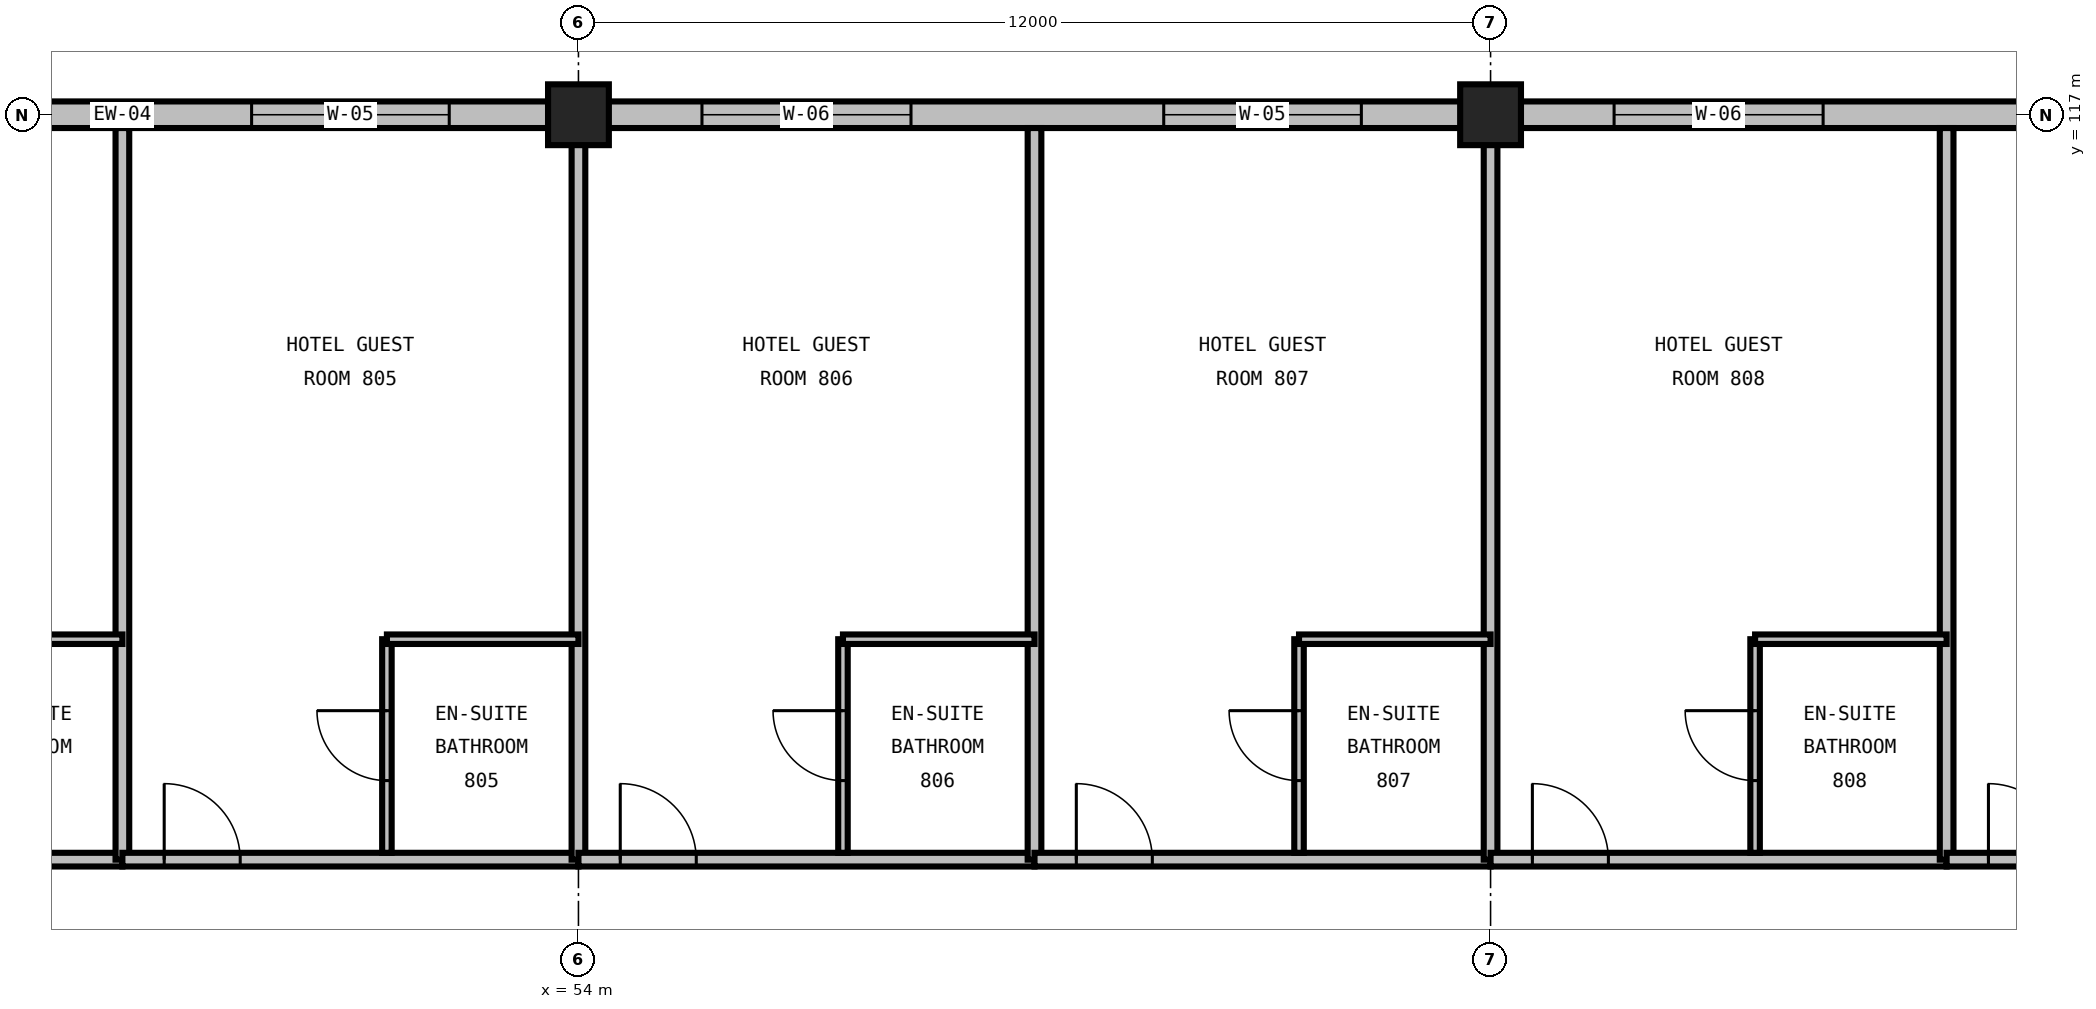
"""IFC4 building model, lengths in metres.
Left out: names, types, materials, properties, quantities, classifications, styles, units other than length and angle.
Written with IfcOpenShell. Run it as: python <this file> out.ifc"""

import sys

from ifc_helpers import new_model, si_unit, direction, frame, frame_2d, origin, origin_2d, place, context, subcontext, project, spatial, rectangle, extrude, element, fill, save


model = new_model("IFC4")
c1 = context("Model", 3, precision=1e-05, world=origin(), true_north=direction((0.0, 1.0)))
c2 = subcontext(c1, "Body", "Model", "MODEL_VIEW")
j1 = project(units=[si_unit("LENGTHUNIT", "METRE"), si_unit("PLANEANGLEUNIT", "RADIAN")], contexts=[c1])
p1 = place(None, origin())
s1 = spatial("IfcSite", under=j1, at=p1, CompositionType="ELEMENT")
p2 = place(p1, origin())
s2 = spatial("IfcBuilding", under=s1, at=p2, CompositionType="ELEMENT")
p3 = place(p2, frame((0.0, 0.0, 38.4)))
s3 = spatial("IfcBuildingStorey", under=s2, at=p3, CompositionType="ELEMENT", Elevation=38.4)
for number, where, z_axis, x_axis in (
    (1, (54.0, 117.0, 0.0), (0.0, 0.0, 1.0), (1.0, 0.0, 0.0)),
    (2, (66.0, 117.0, 0.0), (0.0, 0.0, 1.0), (1.0, 0.0, 0.0)),
):
    element("IfcColumn", number, at=place(p3, frame(where, z_axis=z_axis, x_axis=x_axis)), inside=s3, PredefinedType="COLUMN", context=c2, shape_type="SweptSolid", body=[
        extrude(rectangle(XDim=0.8, YDim=0.8, at=origin_2d()), origin(), (0.0, 0.0, 1.0), 3.6),
    ])
p4 = place(p3, frame((54.0, 117.0, 0.0), z_axis=(0.0, 0.0, 1.0), x_axis=(-1.0, 0.0, 0.0)))
e3 = element("IfcWall", 3, at=p4, inside=s3, PredefinedType="STANDARD", context=c2, shape_type="SweptSolid", body=[
    extrude(rectangle(XDim=12.0, YDim=0.35, at=frame_2d((6.0, 0.0))), origin(), (0.0, 0.0, 1.0), 2.486),
])
p5 = place(p4, frame((1.7, 0.0, 0.72)))
e4 = element("IfcOpeningElement", 4, at=p5, cuts=e3, PredefinedType="OPENING", context=c2, shape_type="SweptSolid", body=[
    extrude(rectangle(XDim=2.6, YDim=1.69, at=frame_2d((1.3, 0.845))), frame((0.0, 0.19, 0.0), z_axis=(0.0, -1.0, 0.0), x_axis=(1.0, 0.0, 0.0)), (0.0, 0.0, 1.0), 0.38),
])
p6 = place(p4, frame((7.625, 0.0, 0.72)))
e5 = element("IfcOpeningElement", 5, at=p6, cuts=e3, PredefinedType="OPENING", context=c2, shape_type="SweptSolid", body=[
    extrude(rectangle(XDim=2.75, YDim=1.69, at=frame_2d((1.375, 0.845))), frame((0.0, 0.19, 0.0), z_axis=(0.0, -1.0, 0.0), x_axis=(1.0, 0.0, 0.0)), (0.0, 0.0, 1.0), 0.38),
])
p7 = place(p3, frame((66.0, 117.0, 0.0), z_axis=(0.0, 0.0, 1.0), x_axis=(-1.0, 0.0, 0.0)))
e6 = element("IfcWall", 6, at=p7, inside=s3, PredefinedType="STANDARD", context=c2, shape_type="SweptSolid", body=[
    extrude(rectangle(XDim=12.0, YDim=0.35, at=frame_2d((6.0, 0.0))), origin(), (0.0, 0.0, 1.0), 2.486),
])
p8 = place(p7, frame((1.7, 0.0, 0.72)))
e7 = element("IfcOpeningElement", 7, at=p8, cuts=e6, PredefinedType="OPENING", context=c2, shape_type="SweptSolid", body=[
    extrude(rectangle(XDim=2.6, YDim=1.69, at=frame_2d((1.3, 0.845))), frame((0.0, 0.19, 0.0), z_axis=(0.0, -1.0, 0.0), x_axis=(1.0, 0.0, 0.0)), (0.0, 0.0, 1.0), 0.38),
])
p9 = place(p7, frame((7.625, 0.0, 0.72)))
e8 = element("IfcOpeningElement", 8, at=p9, cuts=e6, PredefinedType="OPENING", context=c2, shape_type="SweptSolid", body=[
    extrude(rectangle(XDim=2.75, YDim=1.69, at=frame_2d((1.375, 0.845))), frame((0.0, 0.19, 0.0), z_axis=(0.0, -1.0, 0.0), x_axis=(1.0, 0.0, 0.0)), (0.0, 0.0, 1.0), 0.38),
])
p10 = place(p3, frame((78.0, 117.0, 0.0), z_axis=(0.0, 0.0, 1.0), x_axis=(-1.0, 0.0, 0.0)))
e9 = element("IfcWall", 9, at=p10, inside=s3, PredefinedType="STANDARD", context=c2, shape_type="SweptSolid", body=[
    extrude(rectangle(XDim=12.0, YDim=0.35, at=frame_2d((6.0, 0.0))), origin(), (0.0, 0.0, 1.0), 2.486),
])
p11 = place(p10, frame((1.7, 0.0, 0.72)))
e10 = element("IfcOpeningElement", 10, at=p11, cuts=e9, PredefinedType="OPENING", context=c2, shape_type="SweptSolid", body=[
    extrude(rectangle(XDim=2.6, YDim=1.69, at=frame_2d((1.3, 0.845))), frame((0.0, 0.19, 0.0), z_axis=(0.0, -1.0, 0.0), x_axis=(1.0, 0.0, 0.0)), (0.0, 0.0, 1.0), 0.38),
])
p12 = place(p10, frame((7.625, 0.0, 0.72)))
e11 = element("IfcOpeningElement", 11, at=p12, cuts=e9, PredefinedType="OPENING", context=c2, shape_type="SweptSolid", body=[
    extrude(rectangle(XDim=2.75, YDim=1.69, at=frame_2d((1.375, 0.845))), frame((0.0, 0.19, 0.0), z_axis=(0.0, -1.0, 0.0), x_axis=(1.0, 0.0, 0.0)), (0.0, 0.0, 1.0), 0.38),
])
p13 = place(p3, frame((42.0, 107.2, 0.0), z_axis=(0.0, 0.0, 1.0), x_axis=(1.0, 0.0, 0.0)))
e12 = element("IfcWall", 12, at=p13, inside=s3, PredefinedType="PARTITIONING", context=c2, shape_type="SweptSolid", body=[
    extrude(rectangle(XDim=6.0, YDim=0.18, at=frame_2d((3.0, 0.0))), origin(), (0.0, 0.0, 1.0), 3.29),
])
p14 = place(p13, frame((0.55, 0.0, 0.0)))
e13 = element("IfcOpeningElement", 13, at=p14, cuts=e12, PredefinedType="OPENING", context=c2, shape_type="SweptSolid", body=[
    extrude(rectangle(XDim=1.0, YDim=2.15, at=frame_2d((0.5, 1.075))), frame((0.0, 0.105, 0.0), z_axis=(0.0, -1.0, 0.0), x_axis=(1.0, 0.0, 0.0)), (0.0, 0.0, 1.0), 0.21),
])
p15 = place(p3, frame((48.0, 107.2, 0.0), z_axis=(0.0, 0.0, 1.0), x_axis=(0.0, 1.0, 0.0)))
e14 = element("IfcWall", 14, at=p15, inside=s3, PredefinedType="PARTITIONING", context=c2, shape_type="SweptSolid", body=[
    extrude(rectangle(XDim=9.625, YDim=0.18, at=frame_2d((4.812, 0.0))), origin(), (0.0, 0.0, 1.0), 3.29),
])
p16 = place(p3, frame((45.48, 110.1, 0.0), z_axis=(0.0, 0.0, 1.0), x_axis=(1.0, 0.0, 0.0)))
e15 = element("IfcWall", 15, at=p16, inside=s3, PredefinedType="PARTITIONING", context=c2, shape_type="SweptSolid", body=[
    extrude(rectangle(XDim=2.52, YDim=0.125, at=frame_2d((1.26, 0.0))), origin(), (0.0, 0.0, 1.0), 3.29),
])
p17 = place(p3, frame((48.0, 107.2, 0.0), z_axis=(0.0, 0.0, 1.0), x_axis=(1.0, 0.0, 0.0)))
e16 = element("IfcWall", 16, at=p17, inside=s3, PredefinedType="PARTITIONING", context=c2, shape_type="SweptSolid", body=[
    extrude(rectangle(XDim=6.0, YDim=0.18, at=frame_2d((3.0, 0.0))), origin(), (0.0, 0.0, 1.0), 3.29),
])
p18 = place(p17, frame((0.55, 0.0, 0.0)))
e17 = element("IfcOpeningElement", 17, at=p18, cuts=e16, PredefinedType="OPENING", context=c2, shape_type="SweptSolid", body=[
    extrude(rectangle(XDim=1.0, YDim=2.15, at=frame_2d((0.5, 1.075))), frame((0.0, 0.105, 0.0), z_axis=(0.0, -1.0, 0.0), x_axis=(1.0, 0.0, 0.0)), (0.0, 0.0, 1.0), 0.21),
])
p19 = place(p3, frame((54.0, 107.2, 0.0), z_axis=(0.0, 0.0, 1.0), x_axis=(0.0, 1.0, 0.0)))
e18 = element("IfcWall", 18, at=p19, inside=s3, PredefinedType="PARTITIONING", context=c2, shape_type="SweptSolid", body=[
    extrude(rectangle(XDim=9.625, YDim=0.18, at=frame_2d((4.812, 0.0))), origin(), (0.0, 0.0, 1.0), 2.59),
])
p20 = place(p3, frame((51.48, 107.29, 0.0), z_axis=(0.0, 0.0, 1.0), x_axis=(0.0, 1.0, 0.0)))
e19 = element("IfcWall", 19, at=p20, inside=s3, PredefinedType="PARTITIONING", context=c2, shape_type="SweptSolid", body=[
    extrude(rectangle(XDim=2.81, YDim=0.125, at=frame_2d((1.405, 0.0))), origin(), (0.0, 0.0, 1.0), 3.29),
])
p21 = place(p20, frame((0.95, 0.0, 0.0)))
e20 = element("IfcOpeningElement", 20, at=p21, cuts=e19, PredefinedType="OPENING", context=c2, shape_type="SweptSolid", body=[
    extrude(rectangle(XDim=0.92, YDim=2.1, at=frame_2d((0.46, 1.05))), frame((0.0, 0.077, 0.0), z_axis=(0.0, -1.0, 0.0), x_axis=(1.0, 0.0, 0.0)), (0.0, 0.0, 1.0), 0.155),
])
p22 = place(p3, frame((51.48, 110.1, 0.0), z_axis=(0.0, 0.0, 1.0), x_axis=(1.0, 0.0, 0.0)))
e21 = element("IfcWall", 21, at=p22, inside=s3, PredefinedType="PARTITIONING", context=c2, shape_type="SweptSolid", body=[
    extrude(rectangle(XDim=2.52, YDim=0.125, at=frame_2d((1.26, 0.0))), origin(), (0.0, 0.0, 1.0), 3.29),
])
p23 = place(p3, frame((54.0, 107.2, 0.0), z_axis=(0.0, 0.0, 1.0), x_axis=(1.0, 0.0, 0.0)))
e22 = element("IfcWall", 22, at=p23, inside=s3, PredefinedType="PARTITIONING", context=c2, shape_type="SweptSolid", body=[
    extrude(rectangle(XDim=6.0, YDim=0.18, at=frame_2d((3.0, 0.0))), origin(), (0.0, 0.0, 1.0), 3.29),
])
p24 = place(p23, frame((0.55, 0.0, 0.0)))
e23 = element("IfcOpeningElement", 23, at=p24, cuts=e22, PredefinedType="OPENING", context=c2, shape_type="SweptSolid", body=[
    extrude(rectangle(XDim=1.0, YDim=2.15, at=frame_2d((0.5, 1.075))), frame((0.0, 0.105, 0.0), z_axis=(0.0, -1.0, 0.0), x_axis=(1.0, 0.0, 0.0)), (0.0, 0.0, 1.0), 0.21),
])
p25 = place(p3, frame((60.0, 107.2, 0.0), z_axis=(0.0, 0.0, 1.0), x_axis=(0.0, 1.0, 0.0)))
e24 = element("IfcWall", 24, at=p25, inside=s3, PredefinedType="PARTITIONING", context=c2, shape_type="SweptSolid", body=[
    extrude(rectangle(XDim=9.625, YDim=0.18, at=frame_2d((4.812, 0.0))), origin(), (0.0, 0.0, 1.0), 3.29),
])
p26 = place(p3, frame((57.48, 107.29, 0.0), z_axis=(0.0, 0.0, 1.0), x_axis=(0.0, 1.0, 0.0)))
e25 = element("IfcWall", 25, at=p26, inside=s3, PredefinedType="PARTITIONING", context=c2, shape_type="SweptSolid", body=[
    extrude(rectangle(XDim=2.81, YDim=0.125, at=frame_2d((1.405, 0.0))), origin(), (0.0, 0.0, 1.0), 3.29),
])
p27 = place(p26, frame((0.95, 0.0, 0.0)))
e26 = element("IfcOpeningElement", 26, at=p27, cuts=e25, PredefinedType="OPENING", context=c2, shape_type="SweptSolid", body=[
    extrude(rectangle(XDim=0.92, YDim=2.1, at=frame_2d((0.46, 1.05))), frame((0.0, 0.077, 0.0), z_axis=(0.0, -1.0, 0.0), x_axis=(1.0, 0.0, 0.0)), (0.0, 0.0, 1.0), 0.155),
])
p28 = place(p3, frame((57.48, 110.1, 0.0), z_axis=(0.0, 0.0, 1.0), x_axis=(1.0, 0.0, 0.0)))
e27 = element("IfcWall", 27, at=p28, inside=s3, PredefinedType="PARTITIONING", context=c2, shape_type="SweptSolid", body=[
    extrude(rectangle(XDim=2.52, YDim=0.125, at=frame_2d((1.26, 0.0))), origin(), (0.0, 0.0, 1.0), 3.29),
])
p29 = place(p3, frame((60.0, 107.2, 0.0), z_axis=(0.0, 0.0, 1.0), x_axis=(1.0, 0.0, 0.0)))
e28 = element("IfcWall", 28, at=p29, inside=s3, PredefinedType="PARTITIONING", context=c2, shape_type="SweptSolid", body=[
    extrude(rectangle(XDim=6.0, YDim=0.18, at=frame_2d((3.0, 0.0))), origin(), (0.0, 0.0, 1.0), 3.29),
])
p30 = place(p29, frame((0.55, 0.0, 0.0)))
e29 = element("IfcOpeningElement", 29, at=p30, cuts=e28, PredefinedType="OPENING", context=c2, shape_type="SweptSolid", body=[
    extrude(rectangle(XDim=1.0, YDim=2.15, at=frame_2d((0.5, 1.075))), frame((0.0, 0.105, 0.0), z_axis=(0.0, -1.0, 0.0), x_axis=(1.0, 0.0, 0.0)), (0.0, 0.0, 1.0), 0.21),
])
p31 = place(p3, frame((66.0, 107.2, 0.0), z_axis=(0.0, 0.0, 1.0), x_axis=(0.0, 1.0, 0.0)))
e30 = element("IfcWall", 30, at=p31, inside=s3, PredefinedType="PARTITIONING", context=c2, shape_type="SweptSolid", body=[
    extrude(rectangle(XDim=9.625, YDim=0.18, at=frame_2d((4.812, 0.0))), origin(), (0.0, 0.0, 1.0), 2.59),
])
p32 = place(p3, frame((63.48, 107.29, 0.0), z_axis=(0.0, 0.0, 1.0), x_axis=(0.0, 1.0, 0.0)))
e31 = element("IfcWall", 31, at=p32, inside=s3, PredefinedType="PARTITIONING", context=c2, shape_type="SweptSolid", body=[
    extrude(rectangle(XDim=2.81, YDim=0.125, at=frame_2d((1.405, 0.0))), origin(), (0.0, 0.0, 1.0), 3.29),
])
p33 = place(p32, frame((0.95, 0.0, 0.0)))
e32 = element("IfcOpeningElement", 32, at=p33, cuts=e31, PredefinedType="OPENING", context=c2, shape_type="SweptSolid", body=[
    extrude(rectangle(XDim=0.92, YDim=2.1, at=frame_2d((0.46, 1.05))), frame((0.0, 0.077, 0.0), z_axis=(0.0, -1.0, 0.0), x_axis=(1.0, 0.0, 0.0)), (0.0, 0.0, 1.0), 0.155),
])
p34 = place(p3, frame((63.48, 110.1, 0.0), z_axis=(0.0, 0.0, 1.0), x_axis=(1.0, 0.0, 0.0)))
e33 = element("IfcWall", 33, at=p34, inside=s3, PredefinedType="PARTITIONING", context=c2, shape_type="SweptSolid", body=[
    extrude(rectangle(XDim=2.52, YDim=0.125, at=frame_2d((1.26, 0.0))), origin(), (0.0, 0.0, 1.0), 3.29),
])
p35 = place(p3, frame((66.0, 107.2, 0.0), z_axis=(0.0, 0.0, 1.0), x_axis=(1.0, 0.0, 0.0)))
e34 = element("IfcWall", 34, at=p35, inside=s3, PredefinedType="PARTITIONING", context=c2, shape_type="SweptSolid", body=[
    extrude(rectangle(XDim=6.0, YDim=0.18, at=frame_2d((3.0, 0.0))), origin(), (0.0, 0.0, 1.0), 3.29),
])
p36 = place(p35, frame((0.55, 0.0, 0.0)))
e35 = element("IfcOpeningElement", 35, at=p36, cuts=e34, PredefinedType="OPENING", context=c2, shape_type="SweptSolid", body=[
    extrude(rectangle(XDim=1.0, YDim=2.15, at=frame_2d((0.5, 1.075))), frame((0.0, 0.105, 0.0), z_axis=(0.0, -1.0, 0.0), x_axis=(1.0, 0.0, 0.0)), (0.0, 0.0, 1.0), 0.21),
])
p37 = place(p3, frame((72.0, 107.2, 0.0), z_axis=(0.0, 0.0, 1.0), x_axis=(0.0, 1.0, 0.0)))
e36 = element("IfcWall", 36, at=p37, inside=s3, PredefinedType="PARTITIONING", context=c2, shape_type="SweptSolid", body=[
    extrude(rectangle(XDim=9.625, YDim=0.18, at=frame_2d((4.812, 0.0))), origin(), (0.0, 0.0, 1.0), 3.29),
])
p38 = place(p3, frame((69.48, 107.29, 0.0), z_axis=(0.0, 0.0, 1.0), x_axis=(0.0, 1.0, 0.0)))
e37 = element("IfcWall", 37, at=p38, inside=s3, PredefinedType="PARTITIONING", context=c2, shape_type="SweptSolid", body=[
    extrude(rectangle(XDim=2.81, YDim=0.125, at=frame_2d((1.405, 0.0))), origin(), (0.0, 0.0, 1.0), 3.29),
])
p39 = place(p38, frame((0.95, 0.0, 0.0)))
e38 = element("IfcOpeningElement", 38, at=p39, cuts=e37, PredefinedType="OPENING", context=c2, shape_type="SweptSolid", body=[
    extrude(rectangle(XDim=0.92, YDim=2.1, at=frame_2d((0.46, 1.05))), frame((0.0, 0.077, 0.0), z_axis=(0.0, -1.0, 0.0), x_axis=(1.0, 0.0, 0.0)), (0.0, 0.0, 1.0), 0.155),
])
p40 = place(p3, frame((69.48, 110.1, 0.0), z_axis=(0.0, 0.0, 1.0), x_axis=(1.0, 0.0, 0.0)))
e39 = element("IfcWall", 39, at=p40, inside=s3, PredefinedType="PARTITIONING", context=c2, shape_type="SweptSolid", body=[
    extrude(rectangle(XDim=2.52, YDim=0.125, at=frame_2d((1.26, 0.0))), origin(), (0.0, 0.0, 1.0), 3.29),
])
p41 = place(p3, frame((72.0, 107.2, 0.0), z_axis=(0.0, 0.0, 1.0), x_axis=(1.0, 0.0, 0.0)))
e40 = element("IfcWall", 40, at=p41, inside=s3, PredefinedType="PARTITIONING", context=c2, shape_type="SweptSolid", body=[
    extrude(rectangle(XDim=6.0, YDim=0.18, at=frame_2d((3.0, 0.0))), origin(), (0.0, 0.0, 1.0), 3.29),
])
p42 = place(p41, frame((0.55, 0.0, 0.0)))
e41 = element("IfcOpeningElement", 41, at=p42, cuts=e40, PredefinedType="OPENING", context=c2, shape_type="SweptSolid", body=[
    extrude(rectangle(XDim=1.0, YDim=2.15, at=frame_2d((0.5, 1.075))), frame((0.0, 0.105, 0.0), z_axis=(0.0, -1.0, 0.0), x_axis=(1.0, 0.0, 0.0)), (0.0, 0.0, 1.0), 0.21),
])
p43 = place(p5, origin())
e42 = element("IfcWindow", 42, at=p43, inside=s3, PartitioningType="DOUBLE_PANEL_VERTICAL", PredefinedType="WINDOW", context=c2, shape_type="SweptSolid", body=[
    extrude(rectangle(XDim=2.6, YDim=1.69, at=frame_2d((1.3, 0.845))), frame((0.0, 0.03, 0.0), z_axis=(0.0, -1.0, 0.0), x_axis=(1.0, 0.0, 0.0)), (0.0, 0.0, 1.0), 0.06),
])
fill(e4, e42)
p44 = place(p8, origin())
e43 = element("IfcWindow", 43, at=p44, inside=s3, PartitioningType="DOUBLE_PANEL_VERTICAL", PredefinedType="WINDOW", context=c2, shape_type="SweptSolid", body=[
    extrude(rectangle(XDim=2.6, YDim=1.69, at=frame_2d((1.3, 0.845))), frame((0.0, 0.03, 0.0), z_axis=(0.0, -1.0, 0.0), x_axis=(1.0, 0.0, 0.0)), (0.0, 0.0, 1.0), 0.06),
])
fill(e7, e43)
p45 = place(p9, origin())
e44 = element("IfcWindow", 44, at=p45, inside=s3, PartitioningType="TRIPLE_PANEL_VERTICAL", PredefinedType="WINDOW", context=c2, shape_type="SweptSolid", body=[
    extrude(rectangle(XDim=2.75, YDim=1.69, at=frame_2d((1.375, 0.845))), frame((0.0, 0.03, 0.0), z_axis=(0.0, -1.0, 0.0), x_axis=(1.0, 0.0, 0.0)), (0.0, 0.0, 1.0), 0.06),
])
fill(e8, e44)
p46 = place(p12, origin())
e45 = element("IfcWindow", 45, at=p46, inside=s3, PartitioningType="TRIPLE_PANEL_VERTICAL", PredefinedType="WINDOW", context=c2, shape_type="SweptSolid", body=[
    extrude(rectangle(XDim=2.75, YDim=1.69, at=frame_2d((1.375, 0.845))), frame((0.0, 0.03, 0.0), z_axis=(0.0, -1.0, 0.0), x_axis=(1.0, 0.0, 0.0)), (0.0, 0.0, 1.0), 0.06),
])
fill(e11, e45)
p47 = place(p18, origin())
e46 = element("IfcDoor", 46, at=p47, inside=s3, OperationType="SINGLE_SWING_LEFT", PredefinedType="DOOR", context=c2, shape_type="SweptSolid", body=[
    extrude(rectangle(XDim=1.0, YDim=2.15, at=frame_2d((0.5, 1.075))), frame((0.0, 0.025, 0.0), z_axis=(0.0, -1.0, 0.0), x_axis=(1.0, 0.0, 0.0)), (0.0, 0.0, 1.0), 0.05),
])
fill(e17, e46)
p48 = place(p21, origin())
e47 = element("IfcDoor", 47, at=p48, inside=s3, OperationType="SINGLE_SWING_RIGHT", PredefinedType="DOOR", context=c2, shape_type="SweptSolid", body=[
    extrude(rectangle(XDim=0.92, YDim=2.1, at=frame_2d((0.46, 1.05))), frame((0.0, 0.025, 0.0), z_axis=(0.0, -1.0, 0.0), x_axis=(1.0, 0.0, 0.0)), (0.0, 0.0, 1.0), 0.05),
])
fill(e20, e47)
p49 = place(p24, origin())
e48 = element("IfcDoor", 48, at=p49, inside=s3, OperationType="SINGLE_SWING_LEFT", PredefinedType="DOOR", context=c2, shape_type="SweptSolid", body=[
    extrude(rectangle(XDim=1.0, YDim=2.15, at=frame_2d((0.5, 1.075))), frame((0.0, 0.025, 0.0), z_axis=(0.0, -1.0, 0.0), x_axis=(1.0, 0.0, 0.0)), (0.0, 0.0, 1.0), 0.05),
])
fill(e23, e48)
p50 = place(p27, origin())
e49 = element("IfcDoor", 49, at=p50, inside=s3, OperationType="SINGLE_SWING_RIGHT", PredefinedType="DOOR", context=c2, shape_type="SweptSolid", body=[
    extrude(rectangle(XDim=0.92, YDim=2.1, at=frame_2d((0.46, 1.05))), frame((0.0, 0.025, 0.0), z_axis=(0.0, -1.0, 0.0), x_axis=(1.0, 0.0, 0.0)), (0.0, 0.0, 1.0), 0.05),
])
fill(e26, e49)
p51 = place(p30, origin())
e50 = element("IfcDoor", 50, at=p51, inside=s3, OperationType="SINGLE_SWING_LEFT", PredefinedType="DOOR", context=c2, shape_type="SweptSolid", body=[
    extrude(rectangle(XDim=1.0, YDim=2.15, at=frame_2d((0.5, 1.075))), frame((0.0, 0.025, 0.0), z_axis=(0.0, -1.0, 0.0), x_axis=(1.0, 0.0, 0.0)), (0.0, 0.0, 1.0), 0.05),
])
fill(e29, e50)
p52 = place(p33, origin())
e51 = element("IfcDoor", 51, at=p52, inside=s3, OperationType="SINGLE_SWING_RIGHT", PredefinedType="DOOR", context=c2, shape_type="SweptSolid", body=[
    extrude(rectangle(XDim=0.92, YDim=2.1, at=frame_2d((0.46, 1.05))), frame((0.0, 0.025, 0.0), z_axis=(0.0, -1.0, 0.0), x_axis=(1.0, 0.0, 0.0)), (0.0, 0.0, 1.0), 0.05),
])
fill(e32, e51)
p53 = place(p36, origin())
e52 = element("IfcDoor", 52, at=p53, inside=s3, OperationType="SINGLE_SWING_LEFT", PredefinedType="DOOR", context=c2, shape_type="SweptSolid", body=[
    extrude(rectangle(XDim=1.0, YDim=2.15, at=frame_2d((0.5, 1.075))), frame((0.0, 0.025, 0.0), z_axis=(0.0, -1.0, 0.0), x_axis=(1.0, 0.0, 0.0)), (0.0, 0.0, 1.0), 0.05),
])
fill(e35, e52)
p54 = place(p39, origin())
e53 = element("IfcDoor", 53, at=p54, inside=s3, OperationType="SINGLE_SWING_RIGHT", PredefinedType="DOOR", context=c2, shape_type="SweptSolid", body=[
    extrude(rectangle(XDim=0.92, YDim=2.1, at=frame_2d((0.46, 1.05))), frame((0.0, 0.025, 0.0), z_axis=(0.0, -1.0, 0.0), x_axis=(1.0, 0.0, 0.0)), (0.0, 0.0, 1.0), 0.05),
])
fill(e38, e53)
p55 = place(p42, origin())
e54 = element("IfcDoor", 54, at=p55, inside=s3, OperationType="SINGLE_SWING_LEFT", PredefinedType="DOOR", context=c2, shape_type="SweptSolid", body=[
    extrude(rectangle(XDim=1.0, YDim=2.15, at=frame_2d((0.5, 1.075))), frame((0.0, 0.025, 0.0), z_axis=(0.0, -1.0, 0.0), x_axis=(1.0, 0.0, 0.0)), (0.0, 0.0, 1.0), 0.05),
])
fill(e41, e54)
save(model, sys.argv[1])
